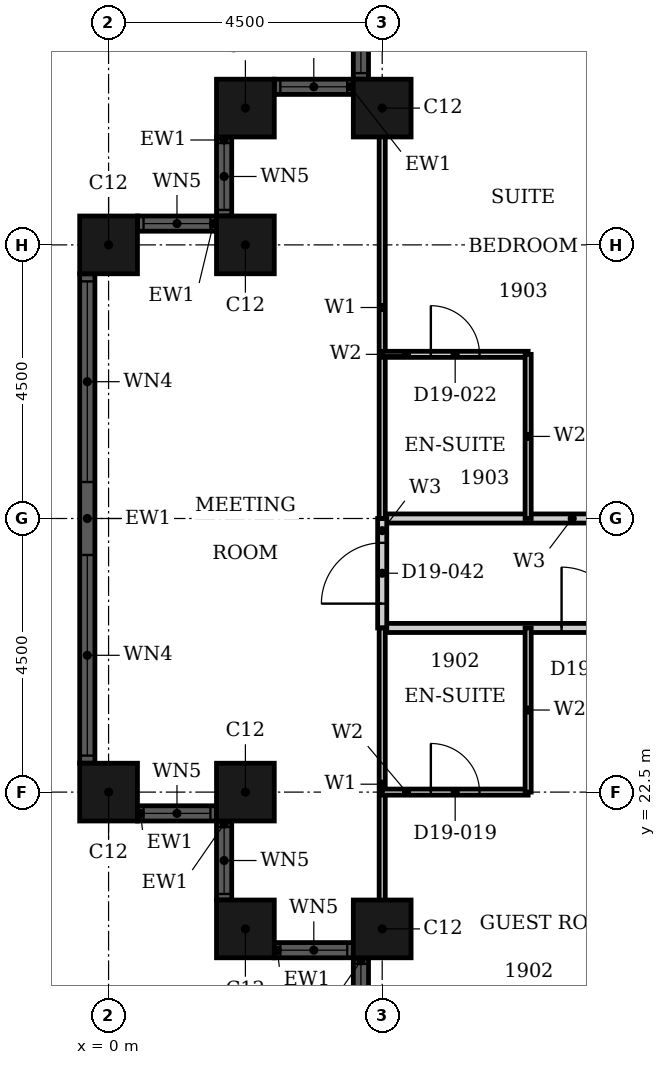
"""IFC4 building model, lengths in metres.
Left out: names, types, materials, properties, quantities, classifications, styles, units other than length and angle.
Written with IfcOpenShell. Run it as: python <this file> out.ifc"""

import sys

from ifc_helpers import new_model, si_unit, direction, frame, frame_2d, origin, origin_2d, place, context, subcontext, project, spatial, rectangle, hollow_rectangle, extrude, element, fill, save


model = new_model("IFC4")
c1 = context("Model", 3, precision=1e-05, world=origin(), true_north=direction((0.0, 1.0)))
c2 = subcontext(c1, "Body", "Model", "MODEL_VIEW")
j1 = project(units=[si_unit("LENGTHUNIT", "METRE"), si_unit("PLANEANGLEUNIT", "RADIAN")], contexts=[c1])
p1 = place(None, origin())
s1 = spatial("IfcSite", under=j1, at=p1, CompositionType="ELEMENT")
p2 = place(p1, origin())
s2 = spatial("IfcBuilding", under=s1, at=p2, CompositionType="ELEMENT")
p3 = place(p2, frame((0.0, 0.0, 81.6)))
s3 = spatial("IfcBuildingStorey", under=s2, at=p3, CompositionType="ELEMENT", Elevation=81.6)
for number, where, z_axis, x_axis in (
    (1, (4.5, 33.75, 0.0), (0.0, 0.0, 1.0), (1.0, 0.0, 0.0)),
    (2, (2.25, 33.75, 0.0), (0.0, 0.0, 1.0), (1.0, 0.0, 0.0)),
    (3, (2.25, 31.5, 0.0), (0.0, 0.0, 1.0), (1.0, 0.0, 0.0)),
    (4, (0.0, 31.5, 0.0), (0.0, 0.0, 1.0), (1.0, 0.0, 0.0)),
    (5, (0.0, 22.5, 0.0), (0.0, 0.0, 1.0), (1.0, 0.0, 0.0)),
    (6, (2.25, 22.5, 0.0), (0.0, 0.0, 1.0), (1.0, 0.0, 0.0)),
    (7, (2.25, 20.25, 0.0), (0.0, 0.0, 1.0), (1.0, 0.0, 0.0)),
    (8, (4.5, 20.25, 0.0), (0.0, 0.0, 1.0), (1.0, 0.0, 0.0)),
):
    element("IfcColumn", number, at=place(p3, frame(where, z_axis=z_axis, x_axis=x_axis)), inside=s3, PredefinedType="COLUMN", context=c2, shape_type="SweptSolid", body=[
        extrude(hollow_rectangle(XDim=0.95, YDim=0.95, WallThickness=0.03, at=origin_2d()), origin(), (0.0, 0.0, 1.0), 3.6),
    ])
p4 = place(p3, frame((4.15, 35.525, 0.0), z_axis=(0.0, 0.0, 1.0), x_axis=(0.0, -1.0, 0.0)))
e9 = element("IfcWall", 9, at=p4, inside=s3, PredefinedType="SOLIDWALL", context=c2, shape_type="SweptSolid", body=[
    extrude(rectangle(XDim=1.3, YDim=0.25, at=frame_2d((0.65, 0.0))), origin(), (0.0, 0.0, 1.0), 3.6),
])
p5 = place(p4, frame((0.1, 0.0, 0.9)))
e10 = element("IfcOpeningElement", 10, at=p5, cuts=e9, PredefinedType="OPENING", context=c2, shape_type="SweptSolid", body=[
    extrude(rectangle(XDim=1.1, YDim=2.08, at=frame_2d((0.55, 1.04))), frame((0.0, 0.135, 0.0), z_axis=(0.0, -1.0, 0.0), x_axis=(1.0, 0.0, 0.0)), (0.0, 0.0, 1.0), 0.27),
])
p6 = place(p3, frame((4.025, 34.1, 0.0), z_axis=(0.0, 0.0, 1.0), x_axis=(-1.0, 0.0, 0.0)))
e11 = element("IfcWall", 11, at=p6, inside=s3, PredefinedType="SOLIDWALL", context=c2, shape_type="SweptSolid", body=[
    extrude(rectangle(XDim=1.3, YDim=0.25, at=frame_2d((0.65, 0.0))), origin(), (0.0, 0.0, 1.0), 3.6),
])
p7 = place(p6, frame((0.1, 0.0, 0.9)))
e12 = element("IfcOpeningElement", 12, at=p7, cuts=e11, PredefinedType="OPENING", context=c2, shape_type="SweptSolid", body=[
    extrude(rectangle(XDim=1.1, YDim=2.08, at=frame_2d((0.55, 1.04))), frame((0.0, 0.135, 0.0), z_axis=(0.0, -1.0, 0.0), x_axis=(1.0, 0.0, 0.0)), (0.0, 0.0, 1.0), 0.27),
])
p8 = place(p3, frame((1.9, 33.275, 0.0), z_axis=(0.0, 0.0, 1.0), x_axis=(0.0, -1.0, 0.0)))
e13 = element("IfcWall", 13, at=p8, inside=s3, PredefinedType="SOLIDWALL", context=c2, shape_type="SweptSolid", body=[
    extrude(rectangle(XDim=1.3, YDim=0.25, at=frame_2d((0.65, 0.0))), origin(), (0.0, 0.0, 1.0), 3.6),
])
p9 = place(p8, frame((0.1, 0.0, 0.9)))
e14 = element("IfcOpeningElement", 14, at=p9, cuts=e13, PredefinedType="OPENING", context=c2, shape_type="SweptSolid", body=[
    extrude(rectangle(XDim=1.1, YDim=2.08, at=frame_2d((0.55, 1.04))), frame((0.0, 0.135, 0.0), z_axis=(0.0, -1.0, 0.0), x_axis=(1.0, 0.0, 0.0)), (0.0, 0.0, 1.0), 0.27),
])
p10 = place(p3, frame((1.775, 31.85, 0.0), z_axis=(0.0, 0.0, 1.0), x_axis=(-1.0, 0.0, 0.0)))
e15 = element("IfcWall", 15, at=p10, inside=s3, PredefinedType="SOLIDWALL", context=c2, shape_type="SweptSolid", body=[
    extrude(rectangle(XDim=1.3, YDim=0.25, at=frame_2d((0.65, 0.0))), origin(), (0.0, 0.0, 1.0), 3.6),
])
p11 = place(p10, frame((0.1, 0.0, 0.9)))
e16 = element("IfcOpeningElement", 16, at=p11, cuts=e15, PredefinedType="OPENING", context=c2, shape_type="SweptSolid", body=[
    extrude(rectangle(XDim=1.1, YDim=2.08, at=frame_2d((0.55, 1.04))), frame((0.0, 0.135, 0.0), z_axis=(0.0, -1.0, 0.0), x_axis=(1.0, 0.0, 0.0)), (0.0, 0.0, 1.0), 0.27),
])
p12 = place(p3, frame((-0.35, 31.025, 0.0), z_axis=(0.0, 0.0, 1.0), x_axis=(0.0, -1.0, 0.0)))
e17 = element("IfcWall", 17, at=p12, inside=s3, PredefinedType="SOLIDWALL", context=c2, shape_type="SweptSolid", body=[
    extrude(rectangle(XDim=8.05, YDim=0.25, at=frame_2d((4.025, 0.0))), origin(), (0.0, 0.0, 1.0), 3.6),
])
p13 = place(p12, frame((0.125, 0.0, 0.9)))
e18 = element("IfcOpeningElement", 18, at=p13, cuts=e17, PredefinedType="OPENING", context=c2, shape_type="SweptSolid", body=[
    extrude(rectangle(XDim=3.3, YDim=2.08, at=frame_2d((1.65, 1.04))), frame((0.0, 0.135, 0.0), z_axis=(0.0, -1.0, 0.0), x_axis=(1.0, 0.0, 0.0)), (0.0, 0.0, 1.0), 0.27),
])
p14 = place(p12, frame((4.625, 0.0, 0.9)))
e19 = element("IfcOpeningElement", 19, at=p14, cuts=e17, PredefinedType="OPENING", context=c2, shape_type="SweptSolid", body=[
    extrude(rectangle(XDim=3.3, YDim=2.08, at=frame_2d((1.65, 1.04))), frame((0.0, 0.135, 0.0), z_axis=(0.0, -1.0, 0.0), x_axis=(1.0, 0.0, 0.0)), (0.0, 0.0, 1.0), 0.27),
])
p15 = place(p3, frame((0.475, 22.15, 0.0), z_axis=(0.0, 0.0, 1.0), x_axis=(1.0, 0.0, 0.0)))
e20 = element("IfcWall", 20, at=p15, inside=s3, PredefinedType="SOLIDWALL", context=c2, shape_type="SweptSolid", body=[
    extrude(rectangle(XDim=1.3, YDim=0.25, at=frame_2d((0.65, 0.0))), origin(), (0.0, 0.0, 1.0), 3.6),
])
p16 = place(p15, frame((0.1, 0.0, 0.9)))
e21 = element("IfcOpeningElement", 21, at=p16, cuts=e20, PredefinedType="OPENING", context=c2, shape_type="SweptSolid", body=[
    extrude(rectangle(XDim=1.1, YDim=2.08, at=frame_2d((0.55, 1.04))), frame((0.0, 0.135, 0.0), z_axis=(0.0, -1.0, 0.0), x_axis=(1.0, 0.0, 0.0)), (0.0, 0.0, 1.0), 0.27),
])
p17 = place(p3, frame((1.9, 22.025, 0.0), z_axis=(0.0, 0.0, 1.0), x_axis=(0.0, -1.0, 0.0)))
e22 = element("IfcWall", 22, at=p17, inside=s3, PredefinedType="SOLIDWALL", context=c2, shape_type="SweptSolid", body=[
    extrude(rectangle(XDim=1.3, YDim=0.25, at=frame_2d((0.65, 0.0))), origin(), (0.0, 0.0, 1.0), 3.6),
])
p18 = place(p17, frame((0.1, 0.0, 0.9)))
e23 = element("IfcOpeningElement", 23, at=p18, cuts=e22, PredefinedType="OPENING", context=c2, shape_type="SweptSolid", body=[
    extrude(rectangle(XDim=1.1, YDim=2.08, at=frame_2d((0.55, 1.04))), frame((0.0, 0.135, 0.0), z_axis=(0.0, -1.0, 0.0), x_axis=(1.0, 0.0, 0.0)), (0.0, 0.0, 1.0), 0.27),
])
p19 = place(p3, frame((2.725, 19.9, 0.0), z_axis=(0.0, 0.0, 1.0), x_axis=(1.0, 0.0, 0.0)))
e24 = element("IfcWall", 24, at=p19, inside=s3, PredefinedType="SOLIDWALL", context=c2, shape_type="SweptSolid", body=[
    extrude(rectangle(XDim=1.3, YDim=0.25, at=frame_2d((0.65, 0.0))), origin(), (0.0, 0.0, 1.0), 3.6),
])
p20 = place(p19, frame((0.1, 0.0, 0.9)))
e25 = element("IfcOpeningElement", 25, at=p20, cuts=e24, PredefinedType="OPENING", context=c2, shape_type="SweptSolid", body=[
    extrude(rectangle(XDim=1.1, YDim=2.08, at=frame_2d((0.55, 1.04))), frame((0.0, 0.135, 0.0), z_axis=(0.0, -1.0, 0.0), x_axis=(1.0, 0.0, 0.0)), (0.0, 0.0, 1.0), 0.27),
])
p21 = place(p3, frame((4.15, 19.775, 0.0), z_axis=(0.0, 0.0, 1.0), x_axis=(0.0, -1.0, 0.0)))
e26 = element("IfcWall", 26, at=p21, inside=s3, PredefinedType="SOLIDWALL", context=c2, shape_type="SweptSolid", body=[
    extrude(rectangle(XDim=1.3, YDim=0.25, at=frame_2d((0.65, 0.0))), origin(), (0.0, 0.0, 1.0), 3.6),
])
p22 = place(p21, frame((0.1, 0.0, 0.9)))
e27 = element("IfcOpeningElement", 27, at=p22, cuts=e26, PredefinedType="OPENING", context=c2, shape_type="SweptSolid", body=[
    extrude(rectangle(XDim=1.1, YDim=2.08, at=frame_2d((0.55, 1.04))), frame((0.0, 0.135, 0.0), z_axis=(0.0, -1.0, 0.0), x_axis=(1.0, 0.0, 0.0)), (0.0, 0.0, 1.0), 0.27),
])
p23 = place(p3, frame((4.5, 25.2, 0.0), z_axis=(0.0, 0.0, 1.0), x_axis=(1.0, 0.0, 0.0)))
e28 = element("IfcWall", 28, at=p23, inside=s3, PredefinedType="PARTITIONING", context=c2, shape_type="SweptSolid", body=[
    extrude(rectangle(XDim=11.7, YDim=0.15, at=frame_2d((5.85, 0.0))), origin(), (0.0, 0.0, 1.0), 3.3),
])
p24 = place(p23, frame((7.45, 0.0, 0.0)))
e29 = element("IfcOpeningElement", 29, at=p24, cuts=e28, PredefinedType="OPENING", context=c2, shape_type="SweptSolid", body=[
    extrude(rectangle(XDim=1.0, YDim=2.1, at=frame_2d((0.5, 1.05))), frame((0.0, 0.085, 0.0), z_axis=(0.0, -1.0, 0.0), x_axis=(1.0, 0.0, 0.0)), (0.0, 0.0, 1.0), 0.17),
])
p25 = place(p23, frame((2.95, 0.0, 0.0)))
e30 = element("IfcOpeningElement", 30, at=p25, cuts=e28, PredefinedType="OPENING", context=c2, shape_type="SweptSolid", body=[
    extrude(rectangle(XDim=1.0, YDim=2.1, at=frame_2d((0.5, 1.05))), frame((0.0, 0.085, 0.0), z_axis=(0.0, -1.0, 0.0), x_axis=(1.0, 0.0, 0.0)), (0.0, 0.0, 1.0), 0.17),
])
p26 = place(p3, frame((4.5, 27.0, 0.0), z_axis=(0.0, 0.0, 1.0), x_axis=(1.0, 0.0, 0.0)))
e31 = element("IfcWall", 31, at=p26, inside=s3, PredefinedType="PARTITIONING", context=c2, shape_type="SweptSolid", body=[
    extrude(rectangle(XDim=11.7, YDim=0.15, at=frame_2d((5.85, 0.0))), origin(), (0.0, 0.0, 1.0), 2.58),
])
p27 = place(p26, frame((6.25, 0.0, 0.0)))
e32 = element("IfcOpeningElement", 32, at=p27, cuts=e31, PredefinedType="OPENING", context=c2, shape_type="SweptSolid", body=[
    extrude(rectangle(XDim=1.0, YDim=2.1, at=frame_2d((0.5, 1.05))), frame((0.0, 0.085, 0.0), z_axis=(0.0, -1.0, 0.0), x_axis=(1.0, 0.0, 0.0)), (0.0, 0.0, 1.0), 0.17),
])
p28 = place(p3, frame((4.5, 25.2, 0.0), z_axis=(0.0, 0.0, 1.0), x_axis=(0.0, 1.0, 0.0)))
e33 = element("IfcWall", 33, at=p28, inside=s3, PredefinedType="PARTITIONING", context=c2, shape_type="SweptSolid", body=[
    extrude(rectangle(XDim=1.8, YDim=0.15, at=frame_2d((0.9, 0.0))), origin(), (0.0, 0.0, 1.0), 3.3),
])
p29 = place(p28, frame((0.4, 0.0, 0.0)))
e34 = element("IfcOpeningElement", 34, at=p29, cuts=e33, PredefinedType="OPENING", context=c2, shape_type="SweptSolid", body=[
    extrude(rectangle(XDim=1.0, YDim=2.1, at=frame_2d((0.5, 1.05))), frame((0.0, 0.085, 0.0), z_axis=(0.0, -1.0, 0.0), x_axis=(1.0, 0.0, 0.0)), (0.0, 0.0, 1.0), 0.17),
])
p30 = place(p3, frame((4.5, 20.06, 0.0), z_axis=(0.0, 0.0, 1.0), x_axis=(0.0, 1.0, 0.0)))
e35 = element("IfcWall", 35, at=p30, inside=s3, PredefinedType="PARTITIONING", context=c2, shape_type="SweptSolid", body=[
    extrude(rectangle(XDim=5.14, YDim=0.1, at=frame_2d((2.57, 0.0))), origin(), (0.0, 0.0, 1.0), 3.3),
])
p31 = place(p3, frame((4.5, 27.0, 0.0), z_axis=(0.0, 0.0, 1.0), x_axis=(0.0, 1.0, 0.0)))
e36 = element("IfcWall", 36, at=p31, inside=s3, PredefinedType="PARTITIONING", context=c2, shape_type="SweptSolid", body=[
    extrude(rectangle(XDim=6.94, YDim=0.1, at=frame_2d((3.47, 0.0))), origin(), (0.0, 0.0, 1.0), 3.3),
])
p32 = place(p3, frame((4.5, 22.5, 0.0), z_axis=(0.0, 0.0, 1.0), x_axis=(1.0, 0.0, 0.0)))
e37 = element("IfcWall", 37, at=p32, inside=s3, PredefinedType="PARTITIONING", context=c2, shape_type="SweptSolid", body=[
    extrude(rectangle(XDim=2.4, YDim=0.1, at=frame_2d((1.2, 0.0))), origin(), (0.0, 0.0, 1.0), 2.58),
])
p33 = place(p32, frame((0.8, 0.0, 0.0)))
e38 = element("IfcOpeningElement", 38, at=p33, cuts=e37, PredefinedType="OPENING", context=c2, shape_type="SweptSolid", body=[
    extrude(rectangle(XDim=0.8, YDim=2.1, at=frame_2d((0.4, 1.05))), frame((0.0, 0.06, 0.0), z_axis=(0.0, -1.0, 0.0), x_axis=(1.0, 0.0, 0.0)), (0.0, 0.0, 1.0), 0.12),
])
p34 = place(p3, frame((4.5, 29.7, 0.0), z_axis=(0.0, 0.0, 1.0), x_axis=(1.0, 0.0, 0.0)))
e39 = element("IfcWall", 39, at=p34, inside=s3, PredefinedType="PARTITIONING", context=c2, shape_type="SweptSolid", body=[
    extrude(rectangle(XDim=2.4, YDim=0.1, at=frame_2d((1.2, 0.0))), origin(), (0.0, 0.0, 1.0), 3.3),
])
p35 = place(p34, frame((0.8, 0.0, 0.0)))
e40 = element("IfcOpeningElement", 40, at=p35, cuts=e39, PredefinedType="OPENING", context=c2, shape_type="SweptSolid", body=[
    extrude(rectangle(XDim=0.8, YDim=2.1, at=frame_2d((0.4, 1.05))), frame((0.0, 0.06, 0.0), z_axis=(0.0, -1.0, 0.0), x_axis=(1.0, 0.0, 0.0)), (0.0, 0.0, 1.0), 0.12),
])
for number, where, z_axis, x_axis in (
    (41, (6.9, 22.5, 0.0), (0.0, 0.0, 1.0), (0.0, 1.0, 0.0)),
    (42, (6.9, 27.0, 0.0), (0.0, 0.0, 1.0), (0.0, 1.0, 0.0)),
):
    element("IfcWall", number, at=place(p3, frame(where, z_axis=z_axis, x_axis=x_axis)), inside=s3, PredefinedType="PARTITIONING", context=c2, shape_type="SweptSolid", body=[
        extrude(rectangle(XDim=2.7, YDim=0.1, at=frame_2d((1.35, 0.0))), origin(), (0.0, 0.0, 1.0), 3.3),
    ])
p36 = place(p5, origin())
e43 = element("IfcWindow", 43, at=p36, inside=s3, PartitioningType="SINGLE_PANEL", PredefinedType="WINDOW", context=c2, shape_type="SweptSolid", body=[
    extrude(rectangle(XDim=1.1, YDim=2.08, at=frame_2d((0.55, 1.04))), frame((0.0, 0.03, 0.0), z_axis=(0.0, -1.0, 0.0), x_axis=(1.0, 0.0, 0.0)), (0.0, 0.0, 1.0), 0.06),
])
fill(e10, e43)
p37 = place(p7, origin())
e44 = element("IfcWindow", 44, at=p37, inside=s3, PartitioningType="SINGLE_PANEL", PredefinedType="WINDOW", context=c2, shape_type="SweptSolid", body=[
    extrude(rectangle(XDim=1.1, YDim=2.08, at=frame_2d((0.55, 1.04))), frame((0.0, 0.03, 0.0), z_axis=(0.0, -1.0, 0.0), x_axis=(1.0, 0.0, 0.0)), (0.0, 0.0, 1.0), 0.06),
])
fill(e12, e44)
p38 = place(p9, origin())
e45 = element("IfcWindow", 45, at=p38, inside=s3, PartitioningType="SINGLE_PANEL", PredefinedType="WINDOW", context=c2, shape_type="SweptSolid", body=[
    extrude(rectangle(XDim=1.1, YDim=2.08, at=frame_2d((0.55, 1.04))), frame((0.0, 0.03, 0.0), z_axis=(0.0, -1.0, 0.0), x_axis=(1.0, 0.0, 0.0)), (0.0, 0.0, 1.0), 0.06),
])
fill(e14, e45)
p39 = place(p11, origin())
e46 = element("IfcWindow", 46, at=p39, inside=s3, PartitioningType="SINGLE_PANEL", PredefinedType="WINDOW", context=c2, shape_type="SweptSolid", body=[
    extrude(rectangle(XDim=1.1, YDim=2.08, at=frame_2d((0.55, 1.04))), frame((0.0, 0.03, 0.0), z_axis=(0.0, -1.0, 0.0), x_axis=(1.0, 0.0, 0.0)), (0.0, 0.0, 1.0), 0.06),
])
fill(e16, e46)
p40 = place(p13, origin())
e47 = element("IfcWindow", 47, at=p40, inside=s3, PartitioningType="SINGLE_PANEL", PredefinedType="WINDOW", context=c2, shape_type="SweptSolid", body=[
    extrude(rectangle(XDim=3.3, YDim=2.08, at=frame_2d((1.65, 1.04))), frame((0.0, 0.03, 0.0), z_axis=(0.0, -1.0, 0.0), x_axis=(1.0, 0.0, 0.0)), (0.0, 0.0, 1.0), 0.06),
])
fill(e18, e47)
p41 = place(p14, origin())
e48 = element("IfcWindow", 48, at=p41, inside=s3, PartitioningType="SINGLE_PANEL", PredefinedType="WINDOW", context=c2, shape_type="SweptSolid", body=[
    extrude(rectangle(XDim=3.3, YDim=2.08, at=frame_2d((1.65, 1.04))), frame((0.0, 0.03, 0.0), z_axis=(0.0, -1.0, 0.0), x_axis=(1.0, 0.0, 0.0)), (0.0, 0.0, 1.0), 0.06),
])
fill(e19, e48)
p42 = place(p16, origin())
e49 = element("IfcWindow", 49, at=p42, inside=s3, PartitioningType="SINGLE_PANEL", PredefinedType="WINDOW", context=c2, shape_type="SweptSolid", body=[
    extrude(rectangle(XDim=1.1, YDim=2.08, at=frame_2d((0.55, 1.04))), frame((0.0, 0.03, 0.0), z_axis=(0.0, -1.0, 0.0), x_axis=(1.0, 0.0, 0.0)), (0.0, 0.0, 1.0), 0.06),
])
fill(e21, e49)
p43 = place(p18, origin())
e50 = element("IfcWindow", 50, at=p43, inside=s3, PartitioningType="SINGLE_PANEL", PredefinedType="WINDOW", context=c2, shape_type="SweptSolid", body=[
    extrude(rectangle(XDim=1.1, YDim=2.08, at=frame_2d((0.55, 1.04))), frame((0.0, 0.03, 0.0), z_axis=(0.0, -1.0, 0.0), x_axis=(1.0, 0.0, 0.0)), (0.0, 0.0, 1.0), 0.06),
])
fill(e23, e50)
p44 = place(p20, origin())
e51 = element("IfcWindow", 51, at=p44, inside=s3, PartitioningType="SINGLE_PANEL", PredefinedType="WINDOW", context=c2, shape_type="SweptSolid", body=[
    extrude(rectangle(XDim=1.1, YDim=2.08, at=frame_2d((0.55, 1.04))), frame((0.0, 0.03, 0.0), z_axis=(0.0, -1.0, 0.0), x_axis=(1.0, 0.0, 0.0)), (0.0, 0.0, 1.0), 0.06),
])
fill(e25, e51)
p45 = place(p22, origin())
e52 = element("IfcWindow", 52, at=p45, inside=s3, PartitioningType="SINGLE_PANEL", PredefinedType="WINDOW", context=c2, shape_type="SweptSolid", body=[
    extrude(rectangle(XDim=1.1, YDim=2.08, at=frame_2d((0.55, 1.04))), frame((0.0, 0.03, 0.0), z_axis=(0.0, -1.0, 0.0), x_axis=(1.0, 0.0, 0.0)), (0.0, 0.0, 1.0), 0.06),
])
fill(e27, e52)
p46 = place(p25, origin())
e53 = element("IfcDoor", 53, at=p46, inside=s3, OperationType="SINGLE_SWING_RIGHT", PredefinedType="DOOR", context=c2, shape_type="SweptSolid", body=[
    extrude(rectangle(XDim=1.0, YDim=2.1, at=frame_2d((0.5, 1.05))), frame((0.0, 0.025, 0.0), z_axis=(0.0, -1.0, 0.0), x_axis=(1.0, 0.0, 0.0)), (0.0, 0.0, 1.0), 0.05),
])
fill(e30, e53)
p47 = place(p33, origin())
e54 = element("IfcDoor", 54, at=p47, inside=s3, OperationType="SINGLE_SWING_RIGHT", PredefinedType="DOOR", context=c2, shape_type="SweptSolid", body=[
    extrude(rectangle(XDim=0.8, YDim=2.1, at=frame_2d((0.4, 1.05))), frame((0.0, 0.025, 0.0), z_axis=(0.0, -1.0, 0.0), x_axis=(1.0, 0.0, 0.0)), (0.0, 0.0, 1.0), 0.05),
])
fill(e38, e54)
p48 = place(p35, origin())
e55 = element("IfcDoor", 55, at=p48, inside=s3, OperationType="SINGLE_SWING_LEFT", PredefinedType="DOOR", context=c2, shape_type="SweptSolid", body=[
    extrude(rectangle(XDim=0.8, YDim=2.1, at=frame_2d((0.4, 1.05))), frame((0.0, 0.025, 0.0), z_axis=(0.0, -1.0, 0.0), x_axis=(1.0, 0.0, 0.0)), (0.0, 0.0, 1.0), 0.05),
])
fill(e40, e55)
p49 = place(p29, origin())
e56 = element("IfcDoor", 56, at=p49, inside=s3, OperationType="SINGLE_SWING_RIGHT", PredefinedType="DOOR", context=c2, shape_type="SweptSolid", body=[
    extrude(rectangle(XDim=1.0, YDim=2.1, at=frame_2d((0.5, 1.05))), frame((0.0, 0.025, 0.0), z_axis=(0.0, -1.0, 0.0), x_axis=(1.0, 0.0, 0.0)), (0.0, 0.0, 1.0), 0.05),
])
fill(e34, e56)
save(model, sys.argv[1])
